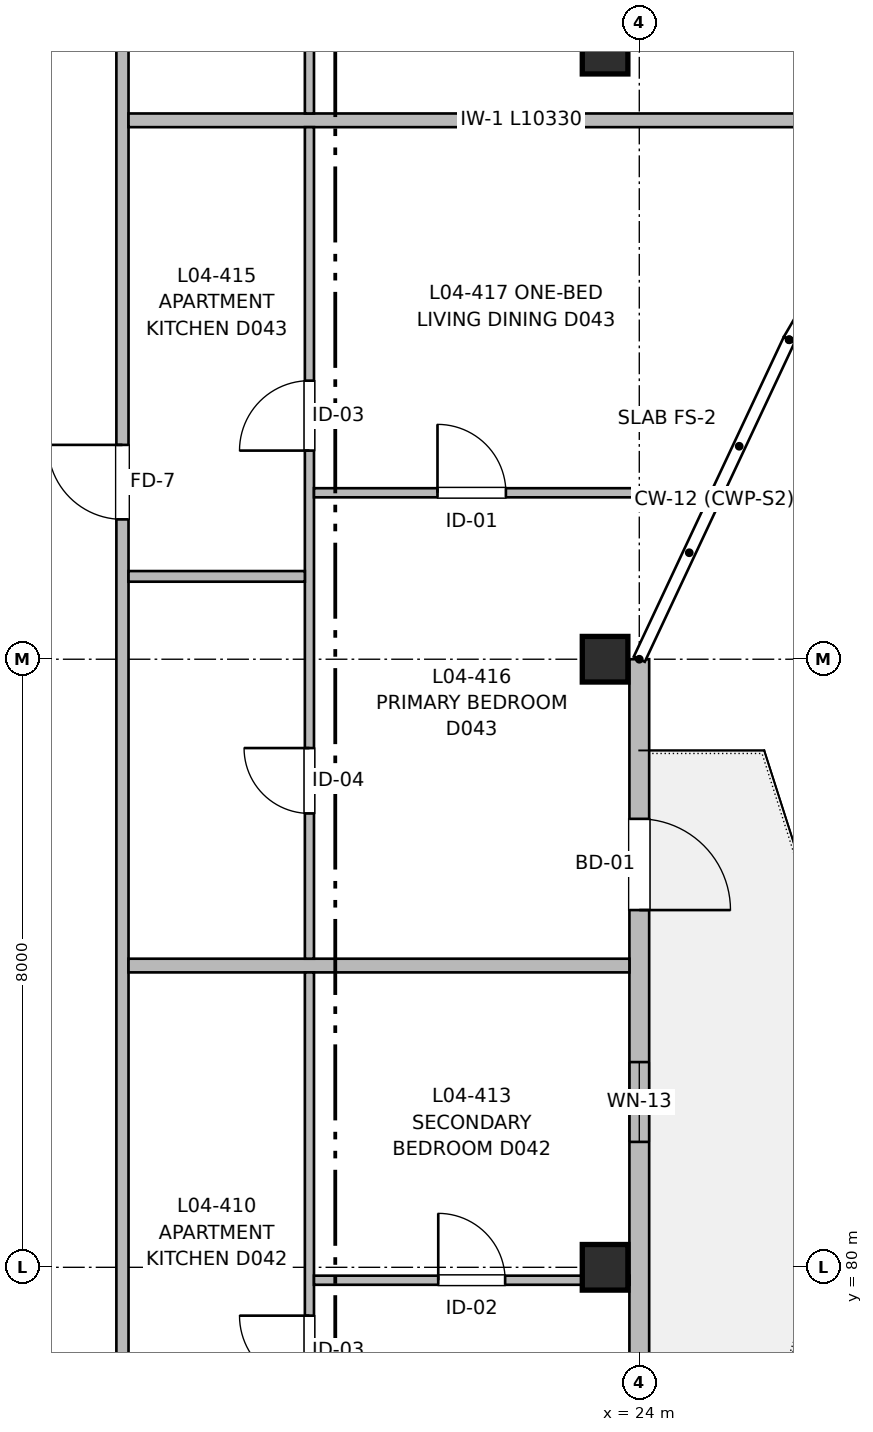
"""IFC4 building model, lengths in metres.
Left out: names, types, materials, properties, quantities, classifications, styles, units other than length and angle.
Written with IfcOpenShell. Run it as: python <this file> out.ifc"""

import sys

from ifc_helpers import new_model, si_unit, direction, frame, frame_2d, origin, origin_2d, place, context, subcontext, project, spatial, rectangle, extrude, element, fill, save


model = new_model("IFC4")
c1 = context("Model", 3, precision=1e-05, world=origin(), true_north=direction((0.0, 1.0)))
c2 = subcontext(c1, "Body", "Model", "MODEL_VIEW")
j1 = project(units=[si_unit("LENGTHUNIT", "METRE"), si_unit("PLANEANGLEUNIT", "RADIAN")], contexts=[c1])
p1 = place(None, origin())
s1 = spatial("IfcSite", under=j1, at=p1, CompositionType="ELEMENT")
p2 = place(p1, origin())
s2 = spatial("IfcBuilding", under=s1, at=p2, CompositionType="ELEMENT")
p3 = place(p2, frame((0.0, 0.0, 13.76)))
s3 = spatial("IfcBuildingStorey", under=s2, at=p3, CompositionType="ELEMENT", Elevation=13.76)
for number, where, z_axis, x_axis in (
    (1, (23.55, 80.0, 0.0), (0.0, 0.0, 1.0), (1.0, 0.0, 0.0)),
    (2, (23.55, 88.0, 0.0), (0.0, 0.0, 1.0), (1.0, 0.0, 0.0)),
    (3, (23.55, 96.0, 0.0), (0.0, 0.0, 1.0), (1.0, 0.0, 0.0)),
):
    element("IfcColumn", number, at=place(p3, frame(where, z_axis=z_axis, x_axis=x_axis)), inside=s3, PredefinedType="COLUMN", context=c2, shape_type="SweptSolid", body=[
        extrude(rectangle(XDim=0.6, YDim=0.6, at=origin_2d()), origin(), (0.0, 0.0, 1.0), 3.2),
    ])
p4 = place(p3, frame((24.0, 88.0, 0.0), z_axis=(0.0, 0.0, 1.0), x_axis=(0.0, -1.0, 0.0)))
e4 = element("IfcWall", 4, at=p4, inside=s3, PredefinedType="SOLIDWALL", context=c2, shape_type="SweptSolid", body=[
    extrude(rectangle(XDim=32.0, YDim=0.26, at=frame_2d((16.0, 0.0))), origin(), (0.0, 0.0, 1.0), 2.98),
])
p5 = place(p4, frame((2.1, 0.0, 0.0)))
e5 = element("IfcOpeningElement", 5, at=p5, cuts=e4, PredefinedType="OPENING", context=c2, shape_type="SweptSolid", body=[
    extrude(rectangle(XDim=1.2, YDim=2.2, at=frame_2d((0.6, 1.1))), frame((0.0, 0.14, 0.0), z_axis=(0.0, -1.0, 0.0), x_axis=(1.0, 0.0, 0.0)), (0.0, 0.0, 1.0), 0.28),
])
p6 = place(p4, frame((5.3, 0.0, 0.9)))
e6 = element("IfcOpeningElement", 6, at=p6, cuts=e4, PredefinedType="OPENING", context=c2, shape_type="SweptSolid", body=[
    extrude(rectangle(XDim=1.05, YDim=1.15, at=frame_2d((0.525, 0.575))), frame((0.0, 0.14, 0.0), z_axis=(0.0, -1.0, 0.0), x_axis=(1.0, 0.0, 0.0)), (0.0, 0.0, 1.0), 0.28),
])
p7 = place(p4, frame((11.35, 0.0, 0.82)))
e7 = element("IfcOpeningElement", 7, at=p7, cuts=e4, PredefinedType="OPENING", context=c2, shape_type="SweptSolid", body=[
    extrude(rectangle(XDim=1.3, YDim=1.4, at=frame_2d((0.65, 0.7))), frame((0.0, 0.14, 0.0), z_axis=(0.0, -1.0, 0.0), x_axis=(1.0, 0.0, 0.0)), (0.0, 0.0, 1.0), 0.28),
])
p8 = place(p4, frame((18.95, 0.0, 0.67)))
e8 = element("IfcOpeningElement", 8, at=p8, cuts=e4, PredefinedType="OPENING", context=c2, shape_type="SweptSolid", body=[
    extrude(rectangle(XDim=2.1, YDim=1.55, at=frame_2d((1.05, 0.775))), frame((0.0, 0.14, 0.0), z_axis=(0.0, -1.0, 0.0), x_axis=(1.0, 0.0, 0.0)), (0.0, 0.0, 1.0), 0.28),
])
p9 = place(p4, frame((28.175, 0.0, 0.72)))
e9 = element("IfcOpeningElement", 9, at=p9, cuts=e4, PredefinedType="OPENING", context=c2, shape_type="SweptSolid", body=[
    extrude(rectangle(XDim=2.25, YDim=1.5, at=frame_2d((1.125, 0.75))), frame((0.0, 0.14, 0.0), z_axis=(0.0, -1.0, 0.0), x_axis=(1.0, 0.0, 0.0)), (0.0, 0.0, 1.0), 0.28),
])
p10 = place(p4, frame((24.466, 0.0, 0.82)))
e10 = element("IfcOpeningElement", 10, at=p10, cuts=e4, PredefinedType="OPENING", context=c2, shape_type="SweptSolid", body=[
    extrude(rectangle(XDim=1.5, YDim=1.4, at=frame_2d((0.75, 0.7))), frame((0.0, 0.14, 0.0), z_axis=(0.0, -1.0, 0.0), x_axis=(1.0, 0.0, 0.0)), (0.0, 0.0, 1.0), 0.28),
])
p11 = place(p4, frame((14.092, 0.0, 0.82)))
e11 = element("IfcOpeningElement", 11, at=p11, cuts=e4, PredefinedType="OPENING", context=c2, shape_type="SweptSolid", body=[
    extrude(rectangle(XDim=1.5, YDim=1.4, at=frame_2d((0.75, 0.7))), frame((0.0, 0.14, 0.0), z_axis=(0.0, -1.0, 0.0), x_axis=(1.0, 0.0, 0.0)), (0.0, 0.0, 1.0), 0.28),
])
p12 = place(p3, frame((17.2, 56.16, 0.0), z_axis=(0.0, 0.0, 1.0), x_axis=(0.0, 1.0, 0.0)))
e12 = element("IfcWall", 12, at=p12, inside=s3, PredefinedType="PARTITIONING", context=c2, shape_type="SweptSolid", body=[
    extrude(rectangle(XDim=50.64, YDim=0.16, at=frame_2d((25.32, 0.0))), origin(), (0.0, 0.0, 1.0), 2.935),
])
p13 = place(p12, frame((6.99, 0.0, 0.0)))
e13 = element("IfcOpeningElement", 13, at=p13, cuts=e12, PredefinedType="OPENING", context=c2, shape_type="SweptSolid", body=[
    extrude(rectangle(XDim=0.98, YDim=2.15, at=frame_2d((0.49, 1.075))), frame((0.0, 0.09, 0.0), z_axis=(0.0, -1.0, 0.0), x_axis=(1.0, 0.0, 0.0)), (0.0, 0.0, 1.0), 0.18),
])
p14 = place(p12, frame((20.92, 0.0, 0.0)))
e14 = element("IfcOpeningElement", 14, at=p14, cuts=e12, PredefinedType="OPENING", context=c2, shape_type="SweptSolid", body=[
    extrude(rectangle(XDim=0.98, YDim=2.15, at=frame_2d((0.49, 1.075))), frame((0.0, 0.09, 0.0), z_axis=(0.0, -1.0, 0.0), x_axis=(1.0, 0.0, 0.0)), (0.0, 0.0, 1.0), 0.18),
])
p15 = place(p12, frame((33.68, 0.0, 0.0)))
e15 = element("IfcOpeningElement", 15, at=p15, cuts=e12, PredefinedType="OPENING", context=c2, shape_type="SweptSolid", body=[
    extrude(rectangle(XDim=0.98, YDim=2.15, at=frame_2d((0.49, 1.075))), frame((0.0, 0.09, 0.0), z_axis=(0.0, -1.0, 0.0), x_axis=(1.0, 0.0, 0.0)), (0.0, 0.0, 1.0), 0.18),
])
p16 = place(p12, frame((45.08, 0.0, 0.0)))
e16 = element("IfcOpeningElement", 16, at=p16, cuts=e12, PredefinedType="OPENING", context=c2, shape_type="SweptSolid", body=[
    extrude(rectangle(XDim=0.98, YDim=2.15, at=frame_2d((0.49, 1.075))), frame((0.0, 0.09, 0.0), z_axis=(0.0, -1.0, 0.0), x_axis=(1.0, 0.0, 0.0)), (0.0, 0.0, 1.0), 0.18),
])
p17 = place(p3, frame((17.28, 83.97, 0.0), z_axis=(0.0, 0.0, 1.0), x_axis=(1.0, 0.0, 0.0)))
e17 = element("IfcWall", 17, at=p17, inside=s3, PredefinedType="PARTITIONING", context=c2, shape_type="SweptSolid", body=[
    extrude(rectangle(XDim=6.59, YDim=0.18, at=frame_2d((3.295, 0.0))), origin(), (0.0, 0.0, 1.0), 2.935),
])
p18 = place(p3, frame((17.28, 95.09, 0.0), z_axis=(0.0, 0.0, 1.0), x_axis=(1.0, 0.0, 0.0)))
e18 = element("IfcWall", 18, at=p18, inside=s3, PredefinedType="PARTITIONING", context=c2, shape_type="SweptSolid", body=[
    extrude(rectangle(XDim=10.33, YDim=0.18, at=frame_2d((5.165, 0.0))), origin(), (0.0, 0.0, 1.0), 2.935),
])
p19 = place(p3, frame((19.66, 69.9, 0.0), z_axis=(0.0, 0.0, 1.0), x_axis=(0.0, 1.0, 0.0)))
e19 = element("IfcWall", 19, at=p19, inside=s3, PredefinedType="PARTITIONING", context=c2, shape_type="SweptSolid", body=[
    extrude(rectangle(XDim=13.98, YDim=0.12, at=frame_2d((6.99, 0.0))), origin(), (0.0, 0.0, 1.0), 2.935),
])
p20 = place(p19, frame((2.443, 0.0, 0.0)))
e20 = element("IfcOpeningElement", 20, at=p20, cuts=e19, PredefinedType="OPENING", context=c2, shape_type="SweptSolid", body=[
    extrude(rectangle(XDim=0.86, YDim=2.1, at=frame_2d((0.43, 1.05))), frame((0.0, 0.07, 0.0), z_axis=(0.0, -1.0, 0.0), x_axis=(1.0, 0.0, 0.0)), (0.0, 0.0, 1.0), 0.14),
])
p21 = place(p19, frame((8.544, 0.0, 0.0)))
e21 = element("IfcOpeningElement", 21, at=p21, cuts=e19, PredefinedType="OPENING", context=c2, shape_type="SweptSolid", body=[
    extrude(rectangle(XDim=0.92, YDim=2.1, at=frame_2d((0.46, 1.05))), frame((0.0, 0.07, 0.0), z_axis=(0.0, -1.0, 0.0), x_axis=(1.0, 0.0, 0.0)), (0.0, 0.0, 1.0), 0.14),
])
p22 = place(p3, frame((19.72, 79.83, 0.0), z_axis=(0.0, 0.0, 1.0), x_axis=(1.0, 0.0, 0.0)))
e22 = element("IfcWall", 22, at=p22, inside=s3, PredefinedType="PARTITIONING", context=c2, shape_type="SweptSolid", body=[
    extrude(rectangle(XDim=4.15, YDim=0.12, at=frame_2d((2.075, 0.0))), origin(), (0.0, 0.0, 1.0), 2.53),
])
p23 = place(p22, frame((1.635, 0.0, 0.0)))
e23 = element("IfcOpeningElement", 23, at=p23, cuts=e22, PredefinedType="OPENING", context=c2, shape_type="SweptSolid", body=[
    extrude(rectangle(XDim=0.88, YDim=2.1, at=frame_2d((0.44, 1.05))), frame((0.0, 0.07, 0.0), z_axis=(0.0, -1.0, 0.0), x_axis=(1.0, 0.0, 0.0)), (0.0, 0.0, 1.0), 0.14),
])
p24 = place(p3, frame((19.66, 84.06, 0.0), z_axis=(0.0, 0.0, 1.0), x_axis=(0.0, 1.0, 0.0)))
e24 = element("IfcWall", 24, at=p24, inside=s3, PredefinedType="PARTITIONING", context=c2, shape_type="SweptSolid", body=[
    extrude(rectangle(XDim=10.94, YDim=0.12, at=frame_2d((5.47, 0.0))), origin(), (0.0, 0.0, 1.0), 2.935),
])
p25 = place(p24, frame((1.911, 0.0, 0.0)))
e25 = element("IfcOpeningElement", 25, at=p25, cuts=e24, PredefinedType="OPENING", context=c2, shape_type="SweptSolid", body=[
    extrude(rectangle(XDim=0.86, YDim=2.1, at=frame_2d((0.43, 1.05))), frame((0.0, 0.07, 0.0), z_axis=(0.0, -1.0, 0.0), x_axis=(1.0, 0.0, 0.0)), (0.0, 0.0, 1.0), 0.14),
])
p26 = place(p24, frame((6.685, 0.0, 0.0)))
e26 = element("IfcOpeningElement", 26, at=p26, cuts=e24, PredefinedType="OPENING", context=c2, shape_type="SweptSolid", body=[
    extrude(rectangle(XDim=0.92, YDim=2.1, at=frame_2d((0.46, 1.05))), frame((0.0, 0.07, 0.0), z_axis=(0.0, -1.0, 0.0), x_axis=(1.0, 0.0, 0.0)), (0.0, 0.0, 1.0), 0.14),
])
p27 = place(p3, frame((17.28, 89.09, 0.0), z_axis=(0.0, 0.0, 1.0), x_axis=(1.0, 0.0, 0.0)))
e27 = element("IfcWall", 27, at=p27, inside=s3, PredefinedType="PARTITIONING", context=c2, shape_type="SweptSolid", body=[
    extrude(rectangle(XDim=2.32, YDim=0.14, at=frame_2d((1.16, 0.0))), origin(), (0.0, 0.0, 1.0), 2.935),
])
p28 = place(p3, frame((19.72, 90.19, 0.0), z_axis=(0.0, 0.0, 1.0), x_axis=(1.0, 0.0, 0.0)))
e28 = element("IfcWall", 28, at=p28, inside=s3, PredefinedType="PARTITIONING", context=c2, shape_type="SweptSolid", body=[
    extrude(rectangle(XDim=5.263, YDim=0.12, at=frame_2d((2.632, 0.0))), origin(), (0.0, 0.0, 1.0), 2.935),
])
p29 = place(p28, frame((1.625, 0.0, 0.0)))
e29 = element("IfcOpeningElement", 29, at=p29, cuts=e28, PredefinedType="OPENING", context=c2, shape_type="SweptSolid", body=[
    extrude(rectangle(XDim=0.9, YDim=2.1, at=frame_2d((0.45, 1.05))), frame((0.0, 0.07, 0.0), z_axis=(0.0, -1.0, 0.0), x_axis=(1.0, 0.0, 0.0)), (0.0, 0.0, 1.0), 0.14),
])
p30 = place(p3, frame((19.66, 95.18, 0.0), z_axis=(0.0, 0.0, 1.0), x_axis=(0.0, 1.0, 0.0)))
e30 = element("IfcWall", 30, at=p30, inside=s3, PredefinedType="PARTITIONING", context=c2, shape_type="SweptSolid", body=[
    extrude(rectangle(XDim=11.54, YDim=0.12, at=frame_2d((5.77, 0.0))), origin(), (0.0, 0.0, 1.0), 2.935),
])
p31 = place(p30, frame((2.018, 0.0, 0.0)))
e31 = element("IfcOpeningElement", 31, at=p31, cuts=e30, PredefinedType="OPENING", context=c2, shape_type="SweptSolid", body=[
    extrude(rectangle(XDim=0.86, YDim=2.1, at=frame_2d((0.43, 1.05))), frame((0.0, 0.07, 0.0), z_axis=(0.0, -1.0, 0.0), x_axis=(1.0, 0.0, 0.0)), (0.0, 0.0, 1.0), 0.14),
])
p32 = place(p30, frame((7.054, 0.0, 0.0)))
e32 = element("IfcOpeningElement", 32, at=p32, cuts=e30, PredefinedType="OPENING", context=c2, shape_type="SweptSolid", body=[
    extrude(rectangle(XDim=0.92, YDim=2.1, at=frame_2d((0.46, 1.05))), frame((0.0, 0.07, 0.0), z_axis=(0.0, -1.0, 0.0), x_axis=(1.0, 0.0, 0.0)), (0.0, 0.0, 1.0), 0.14),
])
p33 = place(p5, origin())
e33 = element("IfcDoor", 33, at=p33, inside=s3, OperationType="SINGLE_SWING_RIGHT", PredefinedType="DOOR", context=c2, shape_type="SweptSolid", body=[
    extrude(rectangle(XDim=1.2, YDim=2.2, at=frame_2d((0.6, 1.1))), frame((0.0, 0.025, 0.0), z_axis=(0.0, -1.0, 0.0), x_axis=(1.0, 0.0, 0.0)), (0.0, 0.0, 1.0), 0.05),
])
fill(e5, e33)
p34 = place(p6, origin())
e34 = element("IfcWindow", 34, at=p34, inside=s3, PartitioningType="SINGLE_PANEL", PredefinedType="WINDOW", context=c2, shape_type="SweptSolid", body=[
    extrude(rectangle(XDim=1.05, YDim=1.15, at=frame_2d((0.525, 0.575))), frame((0.0, 0.03, 0.0), z_axis=(0.0, -1.0, 0.0), x_axis=(1.0, 0.0, 0.0)), (0.0, 0.0, 1.0), 0.06),
])
fill(e6, e34)
p35 = place(p21, origin())
e35 = element("IfcDoor", 35, at=p35, inside=s3, OperationType="SINGLE_SWING_RIGHT", PredefinedType="DOOR", context=c2, shape_type="SweptSolid", body=[
    extrude(rectangle(XDim=0.92, YDim=2.1, at=frame_2d((0.46, 1.05))), frame((0.0, 0.025, 0.0), z_axis=(0.0, -1.0, 0.0), x_axis=(1.0, 0.0, 0.0)), (0.0, 0.0, 1.0), 0.05),
])
fill(e21, e35)
p36 = place(p23, origin())
e36 = element("IfcDoor", 36, at=p36, inside=s3, OperationType="SINGLE_SWING_LEFT", PredefinedType="DOOR", context=c2, shape_type="SweptSolid", body=[
    extrude(rectangle(XDim=0.88, YDim=2.1, at=frame_2d((0.44, 1.05))), frame((0.0, 0.025, 0.0), z_axis=(0.0, -1.0, 0.0), x_axis=(1.0, 0.0, 0.0)), (0.0, 0.0, 1.0), 0.05),
])
fill(e23, e36)
p37 = place(p25, origin())
e37 = element("IfcDoor", 37, at=p37, inside=s3, OperationType="SINGLE_SWING_RIGHT", PredefinedType="DOOR", context=c2, shape_type="SweptSolid", body=[
    extrude(rectangle(XDim=0.86, YDim=2.1, at=frame_2d((0.43, 1.05))), frame((0.0, 0.025, 0.0), z_axis=(0.0, -1.0, 0.0), x_axis=(1.0, 0.0, 0.0)), (0.0, 0.0, 1.0), 0.05),
])
fill(e25, e37)
p38 = place(p26, origin())
e38 = element("IfcDoor", 38, at=p38, inside=s3, OperationType="SINGLE_SWING_LEFT", PredefinedType="DOOR", context=c2, shape_type="SweptSolid", body=[
    extrude(rectangle(XDim=0.92, YDim=2.1, at=frame_2d((0.46, 1.05))), frame((0.0, 0.025, 0.0), z_axis=(0.0, -1.0, 0.0), x_axis=(1.0, 0.0, 0.0)), (0.0, 0.0, 1.0), 0.05),
])
fill(e26, e38)
p39 = place(p15, origin())
e39 = element("IfcDoor", 39, at=p39, inside=s3, OperationType="SINGLE_SWING_RIGHT", PredefinedType="DOOR", context=c2, shape_type="SweptSolid", body=[
    extrude(rectangle(XDim=0.98, YDim=2.15, at=frame_2d((0.49, 1.075))), frame((0.0, 0.025, 0.0), z_axis=(0.0, -1.0, 0.0), x_axis=(1.0, 0.0, 0.0)), (0.0, 0.0, 1.0), 0.05),
])
fill(e15, e39)
p40 = place(p29, origin())
e40 = element("IfcDoor", 40, at=p40, inside=s3, OperationType="SINGLE_SWING_LEFT", PredefinedType="DOOR", context=c2, shape_type="SweptSolid", body=[
    extrude(rectangle(XDim=0.9, YDim=2.1, at=frame_2d((0.45, 1.05))), frame((0.0, 0.025, 0.0), z_axis=(0.0, -1.0, 0.0), x_axis=(1.0, 0.0, 0.0)), (0.0, 0.0, 1.0), 0.05),
])
fill(e29, e40)
save(model, sys.argv[1])
